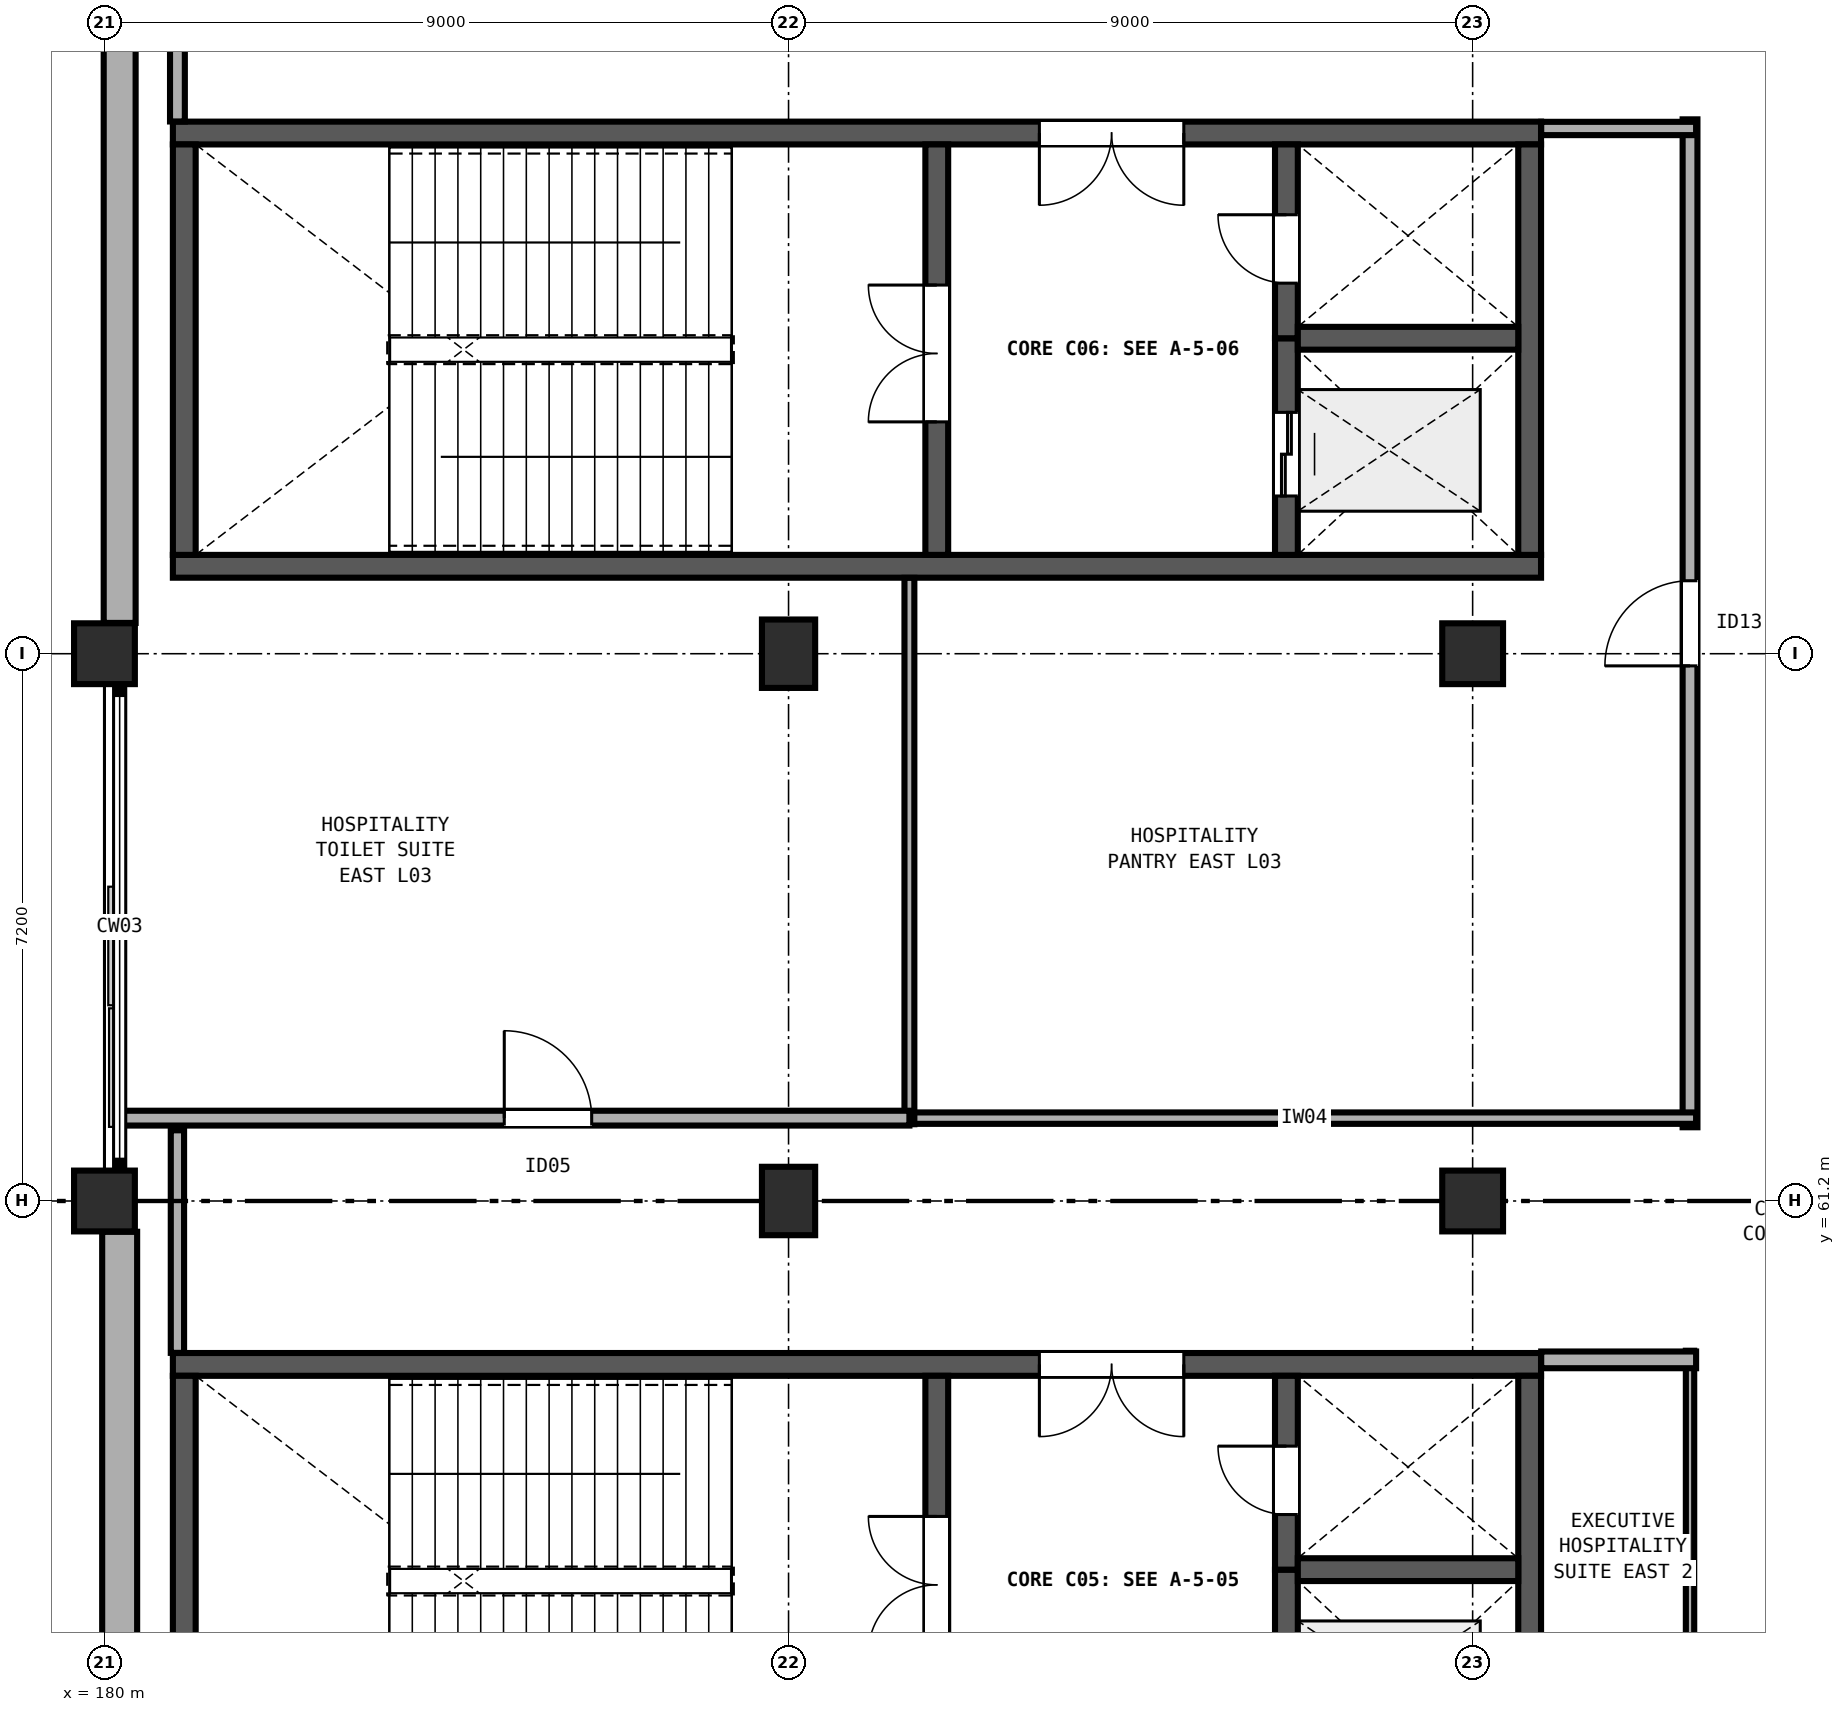
"""IFC4 building model, lengths in metres.
Left out: names, types, materials, properties, quantities, classifications, styles, units other than length and angle.
Written with IfcOpenShell. Run it as: python <this file> out.ifc"""

import sys

from ifc_helpers import new_model, si_unit, direction, frame, frame_2d, origin, origin_2d, place, context, subcontext, project, spatial, rectangle, extrude, element, fill, save


model = new_model("IFC4")
c1 = context("Model", 3, precision=1e-05, world=origin(), true_north=direction((0.0, 1.0)))
c2 = subcontext(c1, "Body", "Model", "MODEL_VIEW")
j1 = project(units=[si_unit("LENGTHUNIT", "METRE"), si_unit("PLANEANGLEUNIT", "RADIAN")], contexts=[c1])
p1 = place(None, origin())
s1 = spatial("IfcSite", under=j1, at=p1, CompositionType="ELEMENT")
p2 = place(p1, origin())
s2 = spatial("IfcBuilding", under=s1, at=p2, CompositionType="ELEMENT")
p3 = place(p2, frame((0.0, 0.0, 14.4)))
s3 = spatial("IfcBuildingStorey", under=s2, at=p3, CompositionType="ELEMENT", Elevation=14.4)
for number, where, z_axis, x_axis in (
    (1, (180.0, 61.2, 0.0), (0.0, 0.0, 1.0), (1.0, 0.0, 0.0)),
    (2, (180.0, 68.4, 0.0), (0.0, 0.0, 1.0), (1.0, 0.0, 0.0)),
):
    element("IfcColumn", number, at=place(p3, frame(where, z_axis=z_axis, x_axis=x_axis)), inside=s3, PredefinedType="COLUMN", context=c2, shape_type="SweptSolid", body=[
        extrude(rectangle(XDim=0.8, YDim=0.8, at=origin_2d()), origin(), (0.0, 0.0, 1.0), 4.8),
    ])
for number, where, z_axis, x_axis in (
    (3, (189.0, 61.2, 0.0), (0.0, 0.0, 1.0), (1.0, 0.0, 0.0)),
    (4, (189.0, 68.4, 0.0), (0.0, 0.0, 1.0), (1.0, 0.0, 0.0)),
):
    element("IfcColumn", number, at=place(p3, frame(where, z_axis=z_axis, x_axis=x_axis)), inside=s3, PredefinedType="COLUMN", context=c2, shape_type="SweptSolid", body=[
        extrude(rectangle(XDim=0.7, YDim=0.9, at=origin_2d()), origin(), (0.0, 0.0, 1.0), 4.8),
    ])
for number, where, z_axis, x_axis in (
    (5, (198.0, 61.2, 0.0), (0.0, 0.0, 1.0), (1.0, 0.0, 0.0)),
    (6, (198.0, 68.4, 0.0), (0.0, 0.0, 1.0), (1.0, 0.0, 0.0)),
):
    element("IfcColumn", number, at=place(p3, frame(where, z_axis=z_axis, x_axis=x_axis)), inside=s3, PredefinedType="COLUMN", context=c2, shape_type="SweptSolid", body=[
        extrude(rectangle(XDim=0.8, YDim=0.8, at=origin_2d()), origin(), (0.0, 0.0, 1.0), 4.8),
    ])
p4 = place(p3, frame((198.9, 59.05, 0.0), z_axis=(0.0, 0.0, 1.0), x_axis=(-1.0, 0.0, 0.0)))
e7 = element("IfcWall", 7, at=p4, inside=s3, PredefinedType="SHEAR", context=c2, shape_type="SweptSolid", body=[
    extrude(rectangle(XDim=18.0, YDim=0.3, at=frame_2d((9.0, 0.0))), origin(), (0.0, 0.0, 1.0), 4.48),
])
p5 = place(p4, frame((4.7, 0.0, 0.0)))
e8 = element("IfcOpeningElement", 8, at=p5, cuts=e7, PredefinedType="OPENING", context=c2, shape_type="SweptSolid", body=[
    extrude(rectangle(XDim=1.9, YDim=2.25, at=frame_2d((0.95, 1.125))), frame((0.0, 0.16, 0.0), z_axis=(0.0, -1.0, 0.0), x_axis=(1.0, 0.0, 0.0)), (0.0, 0.0, 1.0), 0.32),
])
for number, where, z_axis, x_axis in (
    (9, (181.05, 58.9, 0.0), (0.0, 0.0, 1.0), (0.0, -1.0, 0.0)),
    (10, (198.75, 53.5, 0.0), (0.0, 0.0, 1.0), (0.0, 1.0, 0.0)),
):
    element("IfcWall", number, at=place(p3, frame(where, z_axis=z_axis, x_axis=x_axis)), inside=s3, PredefinedType="SHEAR", context=c2, shape_type="SweptSolid", body=[
        extrude(rectangle(XDim=5.4, YDim=0.3, at=frame_2d((2.7, 0.0))), origin(), (0.0, 0.0, 1.0), 4.48),
    ])
p6 = place(p3, frame((190.95, 53.5, 0.0), z_axis=(0.0, 0.0, 1.0), x_axis=(0.0, 1.0, 0.0)))
e11 = element("IfcWall", 11, at=p6, inside=s3, PredefinedType="SHEAR", context=c2, shape_type="SweptSolid", body=[
    extrude(rectangle(XDim=5.4, YDim=0.3, at=frame_2d((2.7, 0.0))), origin(), (0.0, 0.0, 1.0), 4.48),
])
p7 = place(p6, frame((1.75, 0.0, 0.0)))
e12 = element("IfcOpeningElement", 12, at=p7, cuts=e11, PredefinedType="OPENING", context=c2, shape_type="SweptSolid", body=[
    extrude(rectangle(XDim=1.8, YDim=2.25, at=frame_2d((0.9, 1.125))), frame((0.0, 0.16, 0.0), z_axis=(0.0, -1.0, 0.0), x_axis=(1.0, 0.0, 0.0)), (0.0, 0.0, 1.0), 0.32),
])
p8 = place(p3, frame((195.55, 53.5, 0.0), z_axis=(0.0, 0.0, 1.0), x_axis=(0.0, 1.0, 0.0)))
e13 = element("IfcWall", 13, at=p8, inside=s3, PredefinedType="SHEAR", context=c2, shape_type="SweptSolid", body=[
    extrude(rectangle(XDim=2.85, YDim=0.3, at=frame_2d((1.425, 0.0))), origin(), (0.0, 0.0, 1.0), 4.48),
])
p9 = place(p8, frame((0.775, 0.0, 0.0)))
e14 = element("IfcOpeningElement", 14, at=p9, cuts=e13, PredefinedType="OPENING", context=c2, shape_type="SweptSolid", body=[
    extrude(rectangle(XDim=1.1, YDim=2.1, at=frame_2d((0.55, 1.05))), frame((0.0, 0.16, 0.0), z_axis=(0.0, -1.0, 0.0), x_axis=(1.0, 0.0, 0.0)), (0.0, 0.0, 1.0), 0.32),
])
p10 = place(p3, frame((195.55, 56.35, 0.0), z_axis=(0.0, 0.0, 1.0), x_axis=(0.0, 1.0, 0.0)))
e15 = element("IfcWall", 15, at=p10, inside=s3, PredefinedType="SHEAR", context=c2, shape_type="SweptSolid", body=[
    extrude(rectangle(XDim=2.55, YDim=0.3, at=frame_2d((1.275, 0.0))), origin(), (0.0, 0.0, 1.0), 4.48),
])
p11 = place(p10, frame((0.725, 0.0, 0.0)))
e16 = element("IfcOpeningElement", 16, at=p11, cuts=e15, PredefinedType="OPENING", context=c2, shape_type="SweptSolid", body=[
    extrude(rectangle(XDim=0.9, YDim=2.1, at=frame_2d((0.45, 1.05))), frame((0.0, 0.16, 0.0), z_axis=(0.0, -1.0, 0.0), x_axis=(1.0, 0.0, 0.0)), (0.0, 0.0, 1.0), 0.32),
])
p12 = place(p3, frame((195.7, 56.35, 0.0), z_axis=(0.0, 0.0, 1.0), x_axis=(1.0, 0.0, 0.0)))
e17 = element("IfcWall", 17, at=p12, inside=s3, PredefinedType="SHEAR", context=c2, shape_type="SweptSolid", body=[
    extrude(rectangle(XDim=2.9, YDim=0.3, at=frame_2d((1.45, 0.0))), origin(), (0.0, 0.0, 1.0), 4.48),
])
p13 = place(p3, frame((180.9, 69.55, 0.0), z_axis=(0.0, 0.0, 1.0), x_axis=(1.0, 0.0, 0.0)))
e18 = element("IfcWall", 18, at=p13, inside=s3, PredefinedType="SHEAR", context=c2, shape_type="SweptSolid", body=[
    extrude(rectangle(XDim=18.0, YDim=0.3, at=frame_2d((9.0, 0.0))), origin(), (0.0, 0.0, 1.0), 4.48),
])
p14 = place(p3, frame((198.9, 75.25, 0.0), z_axis=(0.0, 0.0, 1.0), x_axis=(-1.0, 0.0, 0.0)))
e19 = element("IfcWall", 19, at=p14, inside=s3, PredefinedType="SHEAR", context=c2, shape_type="SweptSolid", body=[
    extrude(rectangle(XDim=18.0, YDim=0.3, at=frame_2d((9.0, 0.0))), origin(), (0.0, 0.0, 1.0), 4.48),
])
p15 = place(p14, frame((4.7, 0.0, 0.0)))
e20 = element("IfcOpeningElement", 20, at=p15, cuts=e19, PredefinedType="OPENING", context=c2, shape_type="SweptSolid", body=[
    extrude(rectangle(XDim=1.9, YDim=2.25, at=frame_2d((0.95, 1.125))), frame((0.0, 0.16, 0.0), z_axis=(0.0, -1.0, 0.0), x_axis=(1.0, 0.0, 0.0)), (0.0, 0.0, 1.0), 0.32),
])
for number, where, z_axis, x_axis in (
    (21, (181.05, 75.1, 0.0), (0.0, 0.0, 1.0), (0.0, -1.0, 0.0)),
    (22, (198.75, 69.7, 0.0), (0.0, 0.0, 1.0), (0.0, 1.0, 0.0)),
):
    element("IfcWall", number, at=place(p3, frame(where, z_axis=z_axis, x_axis=x_axis)), inside=s3, PredefinedType="SHEAR", context=c2, shape_type="SweptSolid", body=[
        extrude(rectangle(XDim=5.4, YDim=0.3, at=frame_2d((2.7, 0.0))), origin(), (0.0, 0.0, 1.0), 4.48),
    ])
p16 = place(p3, frame((190.95, 69.7, 0.0), z_axis=(0.0, 0.0, 1.0), x_axis=(0.0, 1.0, 0.0)))
e23 = element("IfcWall", 23, at=p16, inside=s3, PredefinedType="SHEAR", context=c2, shape_type="SweptSolid", body=[
    extrude(rectangle(XDim=5.4, YDim=0.3, at=frame_2d((2.7, 0.0))), origin(), (0.0, 0.0, 1.0), 4.48),
])
p17 = place(p16, frame((1.75, 0.0, 0.0)))
e24 = element("IfcOpeningElement", 24, at=p17, cuts=e23, PredefinedType="OPENING", context=c2, shape_type="SweptSolid", body=[
    extrude(rectangle(XDim=1.8, YDim=2.25, at=frame_2d((0.9, 1.125))), frame((0.0, 0.16, 0.0), z_axis=(0.0, -1.0, 0.0), x_axis=(1.0, 0.0, 0.0)), (0.0, 0.0, 1.0), 0.32),
])
p18 = place(p3, frame((195.55, 69.7, 0.0), z_axis=(0.0, 0.0, 1.0), x_axis=(0.0, 1.0, 0.0)))
e25 = element("IfcWall", 25, at=p18, inside=s3, PredefinedType="SHEAR", context=c2, shape_type="SweptSolid", body=[
    extrude(rectangle(XDim=2.85, YDim=0.3, at=frame_2d((1.425, 0.0))), origin(), (0.0, 0.0, 1.0), 4.48),
])
p19 = place(p18, frame((0.775, 0.0, 0.0)))
e26 = element("IfcOpeningElement", 26, at=p19, cuts=e25, PredefinedType="OPENING", context=c2, shape_type="SweptSolid", body=[
    extrude(rectangle(XDim=1.1, YDim=2.1, at=frame_2d((0.55, 1.05))), frame((0.0, 0.16, 0.0), z_axis=(0.0, -1.0, 0.0), x_axis=(1.0, 0.0, 0.0)), (0.0, 0.0, 1.0), 0.32),
])
p20 = place(p3, frame((195.55, 72.55, 0.0), z_axis=(0.0, 0.0, 1.0), x_axis=(0.0, 1.0, 0.0)))
e27 = element("IfcWall", 27, at=p20, inside=s3, PredefinedType="SHEAR", context=c2, shape_type="SweptSolid", body=[
    extrude(rectangle(XDim=2.55, YDim=0.3, at=frame_2d((1.275, 0.0))), origin(), (0.0, 0.0, 1.0), 4.48),
])
p21 = place(p20, frame((0.725, 0.0, 0.0)))
e28 = element("IfcOpeningElement", 28, at=p21, cuts=e27, PredefinedType="OPENING", context=c2, shape_type="SweptSolid", body=[
    extrude(rectangle(XDim=0.9, YDim=2.1, at=frame_2d((0.45, 1.05))), frame((0.0, 0.16, 0.0), z_axis=(0.0, -1.0, 0.0), x_axis=(1.0, 0.0, 0.0)), (0.0, 0.0, 1.0), 0.32),
])
p22 = place(p3, frame((195.7, 72.55, 0.0), z_axis=(0.0, 0.0, 1.0), x_axis=(1.0, 0.0, 0.0)))
e29 = element("IfcWall", 29, at=p22, inside=s3, PredefinedType="SHEAR", context=c2, shape_type="SweptSolid", body=[
    extrude(rectangle(XDim=2.9, YDim=0.3, at=frame_2d((1.45, 0.0))), origin(), (0.0, 0.0, 1.0), 4.48),
])
p23 = place(p3, frame((180.2, 52.605, 0.0), z_axis=(0.0, 0.0, 1.0), x_axis=(0.0, 1.0, 0.0)))
e30 = element("IfcWall", 30, at=p23, inside=s3, PredefinedType="SOLIDWALL", context=c2, shape_type="SweptSolid", body=[
    extrude(rectangle(XDim=8.19, YDim=0.46, at=frame_2d((4.095, 0.0))), origin(), (0.0, 0.0, 1.0), 3.58),
])
p24 = place(p3, frame((180.2, 68.805, 0.0), z_axis=(0.0, 0.0, 1.0), x_axis=(0.0, 1.0, 0.0)))
e31 = element("IfcWall", 31, at=p24, inside=s3, PredefinedType="SOLIDWALL", context=c2, shape_type="SweptSolid", body=[
    extrude(rectangle(XDim=8.19, YDim=0.42, at=frame_2d((4.095, 0.0))), origin(), (0.0, 0.0, 1.0), 3.58),
])
p25 = place(p3, frame((200.86, 47.84, 0.0), z_axis=(0.0, 0.0, 1.0), x_axis=(0.0, 1.0, 0.0)))
e32 = element("IfcWall", 32, at=p25, inside=s3, PredefinedType="PARTITIONING", context=c2, shape_type="SweptSolid", body=[
    extrude(rectangle(XDim=11.39, YDim=0.11, at=frame_2d((5.695, 0.0))), origin(), (0.0, 0.0, 1.0), 3.56),
])
p26 = place(p25, frame((5.22, 0.0, 0.0)))
e33 = element("IfcOpeningElement", 33, at=p26, cuts=e32, PredefinedType="OPENING", context=c2, shape_type="SweptSolid", body=[
    extrude(rectangle(XDim=0.95, YDim=2.18, at=frame_2d((0.475, 1.09))), frame((0.0, 0.065, 0.0), z_axis=(0.0, -1.0, 0.0), x_axis=(1.0, 0.0, 0.0)), (0.0, 0.0, 1.0), 0.13),
])
p27 = place(p3, frame((198.902, 59.11, 0.0), z_axis=(0.0, 0.0, 1.0), x_axis=(1.0, 0.0, 0.0)))
e34 = element("IfcWall", 34, at=p27, inside=s3, PredefinedType="PARTITIONING", context=c2, shape_type="SweptSolid", body=[
    extrude(rectangle(XDim=2.038, YDim=0.22, at=frame_2d((1.019, 0.0))), origin(), (0.0, 0.0, 1.0), 3.56),
])
p28 = place(p3, frame((200.86, 62.17, 0.0), z_axis=(0.0, 0.0, 1.0), x_axis=(0.0, 1.0, 0.0)))
e35 = element("IfcWall", 35, at=p28, inside=s3, PredefinedType="PARTITIONING", context=c2, shape_type="SweptSolid", body=[
    extrude(rectangle(XDim=13.26, YDim=0.195, at=frame_2d((6.63, 0.0))), origin(), (0.0, 0.0, 1.0), 3.56),
])
p29 = place(p28, frame((6.07, 0.0, 0.0)))
e36 = element("IfcOpeningElement", 36, at=p29, cuts=e35, PredefinedType="OPENING", context=c2, shape_type="SweptSolid", body=[
    extrude(rectangle(XDim=1.12, YDim=2.22, at=frame_2d((0.56, 1.11))), frame((0.0, 0.107, 0.0), z_axis=(0.0, -1.0, 0.0), x_axis=(1.0, 0.0, 0.0)), (0.0, 0.0, 1.0), 0.215),
])
p30 = place(p3, frame((198.902, 75.31, 0.0), z_axis=(0.0, 0.0, 1.0), x_axis=(1.0, 0.0, 0.0)))
e37 = element("IfcWall", 37, at=p30, inside=s3, PredefinedType="PARTITIONING", context=c2, shape_type="SweptSolid", body=[
    extrude(rectangle(XDim=2.038, YDim=0.175, at=frame_2d((1.019, 0.0))), origin(), (0.0, 0.0, 1.0), 3.56),
])
p31 = place(p3, frame((200.94, 62.29, 0.0), z_axis=(0.0, 0.0, 1.0), x_axis=(-1.0, 0.0, 0.0)))
e38 = element("IfcWall", 38, at=p31, inside=s3, PredefinedType="PARTITIONING", context=c2, shape_type="SweptSolid", body=[
    extrude(rectangle(XDim=10.31, YDim=0.15, at=frame_2d((5.155, 0.0))), origin(), (0.0, 0.0, 1.0), 3.56),
])
p32 = place(p3, frame((190.59, 62.21, 0.0), z_axis=(0.0, 0.0, 1.0), x_axis=(0.0, 1.0, 0.0)))
e39 = element("IfcWall", 39, at=p32, inside=s3, PredefinedType="PARTITIONING", context=c2, shape_type="SweptSolid", body=[
    extrude(rectangle(XDim=7.188, YDim=0.13, at=frame_2d((3.594, 0.0))), origin(), (0.0, 0.0, 1.0), 3.56),
])
p33 = place(p3, frame((180.233, 62.29, 0.0), z_axis=(0.0, 0.0, 1.0), x_axis=(1.0, 0.0, 0.0)))
e40 = element("IfcWall", 40, at=p33, inside=s3, PredefinedType="PARTITIONING", context=c2, shape_type="SweptSolid", body=[
    extrude(rectangle(XDim=10.357, YDim=0.195, at=frame_2d((5.179, 0.0))), origin(), (0.0, 0.0, 1.0), 3.56),
])
p34 = place(p33, frame((5.027, 0.0, 0.0)))
e41 = element("IfcOpeningElement", 41, at=p34, cuts=e40, PredefinedType="OPENING", context=c2, shape_type="SweptSolid", body=[
    extrude(rectangle(XDim=1.15, YDim=2.15, at=frame_2d((0.575, 1.075))), frame((0.0, 0.107, 0.0), z_axis=(0.0, -1.0, 0.0), x_axis=(1.0, 0.0, 0.0)), (0.0, 0.0, 1.0), 0.215),
])
p35 = place(p3, frame((180.96, 62.13, 0.0), z_axis=(0.0, 0.0, 1.0), x_axis=(0.0, -1.0, 0.0)))
e42 = element("IfcWall", 42, at=p35, inside=s3, PredefinedType="PARTITIONING", context=c2, shape_type="SweptSolid", body=[
    extrude(rectangle(XDim=2.928, YDim=0.175, at=frame_2d((1.464, 0.0))), origin(), (0.0, 0.0, 1.0), 3.56),
])
p36 = place(p3, frame((180.96, 78.33, 0.0), z_axis=(0.0, 0.0, 1.0), x_axis=(0.0, -1.0, 0.0)))
e43 = element("IfcWall", 43, at=p36, inside=s3, PredefinedType="PARTITIONING", context=c2, shape_type="SweptSolid", body=[
    extrude(rectangle(XDim=2.928, YDim=0.195, at=frame_2d((1.464, 0.0))), origin(), (0.0, 0.0, 1.0), 3.56),
])
p37 = place(p7, origin())
e44 = element("IfcDoor", 44, at=p37, inside=s3, OperationType="DOUBLE_DOOR_SINGLE_SWING", PredefinedType="DOOR", context=c2, shape_type="SweptSolid", body=[
    extrude(rectangle(XDim=1.8, YDim=2.25, at=frame_2d((0.9, 1.125))), frame((0.0, 0.025, 0.0), z_axis=(0.0, -1.0, 0.0), x_axis=(1.0, 0.0, 0.0)), (0.0, 0.0, 1.0), 0.05),
])
fill(e12, e44)
p38 = place(p11, origin())
e45 = element("IfcDoor", 45, at=p38, inside=s3, OperationType="SINGLE_SWING_RIGHT", PredefinedType="DOOR", context=c2, shape_type="SweptSolid", body=[
    extrude(rectangle(XDim=0.9, YDim=2.1, at=frame_2d((0.45, 1.05))), frame((0.0, 0.025, 0.0), z_axis=(0.0, -1.0, 0.0), x_axis=(1.0, 0.0, 0.0)), (0.0, 0.0, 1.0), 0.05),
])
fill(e16, e45)
p39 = place(p5, origin())
e46 = element("IfcDoor", 46, at=p39, inside=s3, OperationType="DOUBLE_DOOR_SINGLE_SWING", PredefinedType="DOOR", context=c2, shape_type="SweptSolid", body=[
    extrude(rectangle(XDim=1.9, YDim=2.25, at=frame_2d((0.95, 1.125))), frame((0.0, 0.025, 0.0), z_axis=(0.0, -1.0, 0.0), x_axis=(1.0, 0.0, 0.0)), (0.0, 0.0, 1.0), 0.05),
])
fill(e8, e46)
p40 = place(p17, origin())
e47 = element("IfcDoor", 47, at=p40, inside=s3, OperationType="DOUBLE_DOOR_SINGLE_SWING", PredefinedType="DOOR", context=c2, shape_type="SweptSolid", body=[
    extrude(rectangle(XDim=1.8, YDim=2.25, at=frame_2d((0.9, 1.125))), frame((0.0, 0.025, 0.0), z_axis=(0.0, -1.0, 0.0), x_axis=(1.0, 0.0, 0.0)), (0.0, 0.0, 1.0), 0.05),
])
fill(e24, e47)
p41 = place(p21, origin())
e48 = element("IfcDoor", 48, at=p41, inside=s3, OperationType="SINGLE_SWING_RIGHT", PredefinedType="DOOR", context=c2, shape_type="SweptSolid", body=[
    extrude(rectangle(XDim=0.9, YDim=2.1, at=frame_2d((0.45, 1.05))), frame((0.0, 0.025, 0.0), z_axis=(0.0, -1.0, 0.0), x_axis=(1.0, 0.0, 0.0)), (0.0, 0.0, 1.0), 0.05),
])
fill(e28, e48)
p42 = place(p19, origin())
e49 = element("IfcDoor", 49, at=p42, inside=s3, OperationType="DOUBLE_DOOR_SLIDING", PredefinedType="DOOR", context=c2, shape_type="SweptSolid", body=[
    extrude(rectangle(XDim=1.1, YDim=2.1, at=frame_2d((0.55, 1.05))), frame((0.0, 0.025, 0.0), z_axis=(0.0, -1.0, 0.0), x_axis=(1.0, 0.0, 0.0)), (0.0, 0.0, 1.0), 0.05),
])
fill(e26, e49)
p43 = place(p15, origin())
e50 = element("IfcDoor", 50, at=p43, inside=s3, OperationType="DOUBLE_DOOR_SINGLE_SWING", PredefinedType="DOOR", context=c2, shape_type="SweptSolid", body=[
    extrude(rectangle(XDim=1.9, YDim=2.25, at=frame_2d((0.95, 1.125))), frame((0.0, 0.025, 0.0), z_axis=(0.0, -1.0, 0.0), x_axis=(1.0, 0.0, 0.0)), (0.0, 0.0, 1.0), 0.05),
])
fill(e20, e50)
p44 = place(p29, origin())
e51 = element("IfcDoor", 51, at=p44, inside=s3, OperationType="SINGLE_SWING_LEFT", PredefinedType="DOOR", context=c2, shape_type="SweptSolid", body=[
    extrude(rectangle(XDim=1.12, YDim=2.22, at=frame_2d((0.56, 1.11))), frame((0.0, 0.025, 0.0), z_axis=(0.0, -1.0, 0.0), x_axis=(1.0, 0.0, 0.0)), (0.0, 0.0, 1.0), 0.05),
])
fill(e36, e51)
p45 = place(p34, origin())
e52 = element("IfcDoor", 52, at=p45, inside=s3, OperationType="SINGLE_SWING_LEFT", PredefinedType="DOOR", context=c2, shape_type="SweptSolid", body=[
    extrude(rectangle(XDim=1.15, YDim=2.15, at=frame_2d((0.575, 1.075))), frame((0.0, 0.025, 0.0), z_axis=(0.0, -1.0, 0.0), x_axis=(1.0, 0.0, 0.0)), (0.0, 0.0, 1.0), 0.05),
])
fill(e41, e52)
save(model, sys.argv[1])
